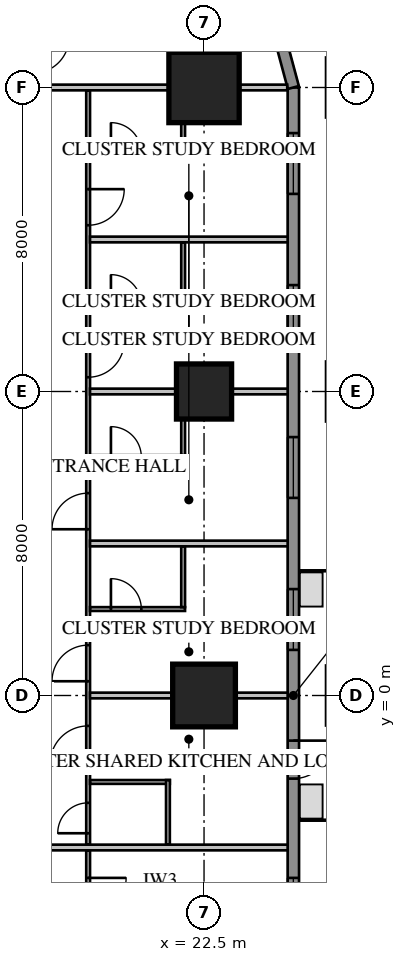
"""IFC4 building model, lengths in metres.
Left out: names, types, materials, properties, quantities, classifications, styles, units other than length and angle.
Written with IfcOpenShell. Run it as: python <this file> out.ifc"""

import sys

from ifc_helpers import new_model, si_unit, direction, frame, frame_2d, origin, origin_2d, place, context, subcontext, project, spatial, rectangle, extrude, element, fill, save


model = new_model("IFC4")
c1 = context("Model", 3, precision=1e-05, world=origin(), true_north=direction((0.0, 1.0)))
c2 = subcontext(c1, "Body", "Model", "MODEL_VIEW")
j1 = project(units=[si_unit("LENGTHUNIT", "METRE"), si_unit("PLANEANGLEUNIT", "RADIAN")], contexts=[c1])
p1 = place(None, origin())
s1 = spatial("IfcSite", under=j1, at=p1, CompositionType="ELEMENT")
p2 = place(p1, origin())
s2 = spatial("IfcBuilding", under=s1, at=p2, CompositionType="ELEMENT")
p3 = place(p2, frame((0.0, 0.0, 50.65)))
s3 = spatial("IfcBuildingStorey", under=s2, at=p3, CompositionType="ELEMENT", Elevation=50.65)
p4 = place(p3, frame((22.5, 0.0, 0.0), z_axis=(0.0, 0.0, 1.0), x_axis=(1.0, 0.0, 0.0)))
e1 = element("IfcColumn", 1, at=p4, inside=s3, PredefinedType="COLUMN", context=c2, shape_type="SweptSolid", body=[
    extrude(rectangle(XDim=1.65, YDim=1.65, at=origin_2d()), origin(), (0.0, 0.0, 1.0), 3.413),
])
p5 = place(p3, frame((22.5, 8.0, 0.0), z_axis=(0.0, 0.0, 1.0), x_axis=(1.0, 0.0, 0.0)))
e2 = element("IfcColumn", 2, at=p5, inside=s3, PredefinedType="COLUMN", context=c2, shape_type="SweptSolid", body=[
    extrude(rectangle(XDim=1.45, YDim=1.45, at=origin_2d()), origin(), (0.0, 0.0, 1.0), 3.413),
])
p6 = place(p3, frame((22.5, 16.0, 0.0), z_axis=(0.0, 0.0, 1.0), x_axis=(1.0, 0.0, 0.0)))
e3 = element("IfcColumn", 3, at=p6, inside=s3, PredefinedType="COLUMN", context=c2, shape_type="SweptSolid", body=[
    extrude(rectangle(XDim=1.85, YDim=1.85, at=origin_2d()), origin(), (0.0, 0.0, 1.0), 3.413),
])
p7 = place(p3, frame((24.85, -16.0, 0.0), z_axis=(0.0, 0.0, 1.0), x_axis=(0.0, 1.0, 0.0)))
e4 = element("IfcWall", 4, at=p7, inside=s3, PredefinedType="SOLIDWALL", context=c2, shape_type="SweptSolid", body=[
    extrude(rectangle(XDim=32.0, YDim=0.3, at=frame_2d((16.0, 0.0))), origin(), (0.0, 0.0, 1.0), 3.65),
])
p8 = place(p7, frame((1.2, 0.0, 0.75)))
e5 = element("IfcOpeningElement", 5, at=p8, cuts=e4, PredefinedType="OPENING", context=c2, shape_type="SweptSolid", body=[
    extrude(rectangle(XDim=1.6, YDim=1.8, at=frame_2d((0.8, 0.9))), frame((0.0, 0.17, 0.0), z_axis=(0.0, -1.0, 0.0), x_axis=(1.0, 0.0, 0.0)), (0.0, 0.0, 1.0), 0.34),
])
p9 = place(p7, frame((5.2, 0.0, 0.75)))
e6 = element("IfcOpeningElement", 6, at=p9, cuts=e4, PredefinedType="OPENING", context=c2, shape_type="SweptSolid", body=[
    extrude(rectangle(XDim=1.6, YDim=1.8, at=frame_2d((0.8, 0.9))), frame((0.0, 0.17, 0.0), z_axis=(0.0, -1.0, 0.0), x_axis=(1.0, 0.0, 0.0)), (0.0, 0.0, 1.0), 0.34),
])
p10 = place(p7, frame((17.2, 0.0, 0.75)))
e7 = element("IfcOpeningElement", 7, at=p10, cuts=e4, PredefinedType="OPENING", context=c2, shape_type="SweptSolid", body=[
    extrude(rectangle(XDim=1.6, YDim=1.8, at=frame_2d((0.8, 0.9))), frame((0.0, 0.17, 0.0), z_axis=(0.0, -1.0, 0.0), x_axis=(1.0, 0.0, 0.0)), (0.0, 0.0, 1.0), 0.34),
])
p11 = place(p7, frame((21.2, 0.0, 0.75)))
e8 = element("IfcOpeningElement", 8, at=p11, cuts=e4, PredefinedType="OPENING", context=c2, shape_type="SweptSolid", body=[
    extrude(rectangle(XDim=1.6, YDim=1.8, at=frame_2d((0.8, 0.9))), frame((0.0, 0.17, 0.0), z_axis=(0.0, -1.0, 0.0), x_axis=(1.0, 0.0, 0.0)), (0.0, 0.0, 1.0), 0.34),
])
p12 = place(p7, frame((25.2, 0.0, 0.75)))
e9 = element("IfcOpeningElement", 9, at=p12, cuts=e4, PredefinedType="OPENING", context=c2, shape_type="SweptSolid", body=[
    extrude(rectangle(XDim=1.6, YDim=1.8, at=frame_2d((0.8, 0.9))), frame((0.0, 0.17, 0.0), z_axis=(0.0, -1.0, 0.0), x_axis=(1.0, 0.0, 0.0)), (0.0, 0.0, 1.0), 0.34),
])
p13 = place(p7, frame((29.2, 0.0, 0.75)))
e10 = element("IfcOpeningElement", 10, at=p13, cuts=e4, PredefinedType="OPENING", context=c2, shape_type="SweptSolid", body=[
    extrude(rectangle(XDim=1.6, YDim=1.8, at=frame_2d((0.8, 0.9))), frame((0.0, 0.17, 0.0), z_axis=(0.0, -1.0, 0.0), x_axis=(1.0, 0.0, 0.0)), (0.0, 0.0, 1.0), 0.34),
])
p14 = place(p7, frame((8.8, 0.0, 0.75)))
e11 = element("IfcOpeningElement", 11, at=p14, cuts=e4, PredefinedType="OPENING", context=c2, shape_type="SweptSolid", body=[
    extrude(rectangle(XDim=2.4, YDim=1.8, at=frame_2d((1.2, 0.9))), frame((0.0, 0.17, 0.0), z_axis=(0.0, -1.0, 0.0), x_axis=(1.0, 0.0, 0.0)), (0.0, 0.0, 1.0), 0.34),
])
p15 = place(p7, frame((13.812, 0.0, 0.0)))
e12 = element("IfcOpeningElement", 12, at=p15, cuts=e4, PredefinedType="OPENING", context=c2, shape_type="SweptSolid", body=[
    extrude(rectangle(XDim=1.0, YDim=2.4, at=frame_2d((0.5, 1.2))), frame((0.0, 0.17, 0.0), z_axis=(0.0, -1.0, 0.0), x_axis=(1.0, 0.0, 0.0)), (0.0, 0.0, 1.0), 0.34),
])
p16 = place(p3, frame((24.85, 16.0, 0.0), z_axis=(0.0, 0.0, 1.0), x_axis=(-0.258839972501, 0.965920218567, 0.0)))
e13 = element("IfcWall", 13, at=p16, inside=s3, PredefinedType="SOLIDWALL", context=c2, shape_type="SweptSolid", body=[
    extrude(rectangle(XDim=4.581, YDim=0.3, at=frame_2d((2.291, 0.0))), origin(), (0.0, 0.0, 1.0), 3.65),
])
p17 = place(p3, frame((19.45, -15.925, 0.0), z_axis=(0.0, 0.0, 1.0), x_axis=(0.0, 1.0, 0.0)))
e14 = element("IfcWall", 14, at=p17, inside=s3, PredefinedType="PARTITIONING", context=c2, shape_type="SweptSolid", body=[
    extrude(rectangle(XDim=11.85, YDim=0.1, at=frame_2d((5.925, 0.0))), origin(), (0.0, 0.0, 1.0), 3.65),
])
p18 = place(p17, frame((10.125, 0.0, 0.0)))
e15 = element("IfcOpeningElement", 15, at=p18, cuts=e14, PredefinedType="OPENING", context=c2, shape_type="SweptSolid", body=[
    extrude(rectangle(XDim=1.0, YDim=2.1, at=frame_2d((0.5, 1.05))), frame((0.0, 0.07, 0.0), z_axis=(0.0, -1.0, 0.0), x_axis=(1.0, 0.0, 0.0)), (0.0, 0.0, 1.0), 0.14),
])
p19 = place(p17, frame((8.3, 0.0, 0.0)))
e16 = element("IfcOpeningElement", 16, at=p19, cuts=e14, PredefinedType="OPENING", context=c2, shape_type="SweptSolid", body=[
    extrude(rectangle(XDim=0.8, YDim=2.1, at=frame_2d((0.4, 1.05))), frame((0.0, 0.07, 0.0), z_axis=(0.0, -1.0, 0.0), x_axis=(1.0, 0.0, 0.0)), (0.0, 0.0, 1.0), 0.14),
])
p20 = place(p17, frame((0.3, 0.0, 0.0)))
e17 = element("IfcOpeningElement", 17, at=p20, cuts=e14, PredefinedType="OPENING", context=c2, shape_type="SweptSolid", body=[
    extrude(rectangle(XDim=0.95, YDim=2.1, at=frame_2d((0.475, 1.05))), frame((0.0, 0.07, 0.0), z_axis=(0.0, -1.0, 0.0), x_axis=(1.0, 0.0, 0.0)), (0.0, 0.0, 1.0), 0.14),
])
p21 = place(p17, frame((4.3, 0.0, 0.0)))
e18 = element("IfcOpeningElement", 18, at=p21, cuts=e14, PredefinedType="OPENING", context=c2, shape_type="SweptSolid", body=[
    extrude(rectangle(XDim=0.95, YDim=2.1, at=frame_2d((0.475, 1.05))), frame((0.0, 0.07, 0.0), z_axis=(0.0, -1.0, 0.0), x_axis=(1.0, 0.0, 0.0)), (0.0, 0.0, 1.0), 0.14),
])
p22 = place(p3, frame((19.45, -3.925, 0.0), z_axis=(0.0, 0.0, 1.0), x_axis=(0.0, 1.0, 0.0)))
e19 = element("IfcWall", 19, at=p22, inside=s3, PredefinedType="PARTITIONING", context=c2, shape_type="SweptSolid", body=[
    extrude(rectangle(XDim=19.85, YDim=0.1, at=frame_2d((9.925, 0.0))), origin(), (0.0, 0.0, 1.0), 3.65),
])
p23 = place(p22, frame((2.125, 0.0, 0.0)))
e20 = element("IfcOpeningElement", 20, at=p23, cuts=e19, PredefinedType="OPENING", context=c2, shape_type="SweptSolid", body=[
    extrude(rectangle(XDim=1.0, YDim=2.1, at=frame_2d((0.5, 1.05))), frame((0.0, 0.07, 0.0), z_axis=(0.0, -1.0, 0.0), x_axis=(1.0, 0.0, 0.0)), (0.0, 0.0, 1.0), 0.14),
])
p24 = place(p22, frame((0.3, 0.0, 0.0)))
e21 = element("IfcOpeningElement", 21, at=p24, cuts=e19, PredefinedType="OPENING", context=c2, shape_type="SweptSolid", body=[
    extrude(rectangle(XDim=0.8, YDim=2.1, at=frame_2d((0.4, 1.05))), frame((0.0, 0.07, 0.0), z_axis=(0.0, -1.0, 0.0), x_axis=(1.0, 0.0, 0.0)), (0.0, 0.0, 1.0), 0.14),
])
p25 = place(p22, frame((4.3, 0.0, 0.0)))
e22 = element("IfcOpeningElement", 22, at=p25, cuts=e19, PredefinedType="OPENING", context=c2, shape_type="SweptSolid", body=[
    extrude(rectangle(XDim=0.95, YDim=2.1, at=frame_2d((0.475, 1.05))), frame((0.0, 0.07, 0.0), z_axis=(0.0, -1.0, 0.0), x_axis=(1.0, 0.0, 0.0)), (0.0, 0.0, 1.0), 0.14),
])
p26 = place(p22, frame((8.3, 0.0, 0.0)))
e23 = element("IfcOpeningElement", 23, at=p26, cuts=e19, PredefinedType="OPENING", context=c2, shape_type="SweptSolid", body=[
    extrude(rectangle(XDim=0.95, YDim=2.1, at=frame_2d((0.475, 1.05))), frame((0.0, 0.07, 0.0), z_axis=(0.0, -1.0, 0.0), x_axis=(1.0, 0.0, 0.0)), (0.0, 0.0, 1.0), 0.14),
])
p27 = place(p22, frame((12.3, 0.0, 0.0)))
e24 = element("IfcOpeningElement", 24, at=p27, cuts=e19, PredefinedType="OPENING", context=c2, shape_type="SweptSolid", body=[
    extrude(rectangle(XDim=0.95, YDim=2.1, at=frame_2d((0.475, 1.05))), frame((0.0, 0.07, 0.0), z_axis=(0.0, -1.0, 0.0), x_axis=(1.0, 0.0, 0.0)), (0.0, 0.0, 1.0), 0.14),
])
p28 = place(p22, frame((16.3, 0.0, 0.0)))
e25 = element("IfcOpeningElement", 25, at=p28, cuts=e19, PredefinedType="OPENING", context=c2, shape_type="SweptSolid", body=[
    extrude(rectangle(XDim=0.95, YDim=2.1, at=frame_2d((0.475, 1.05))), frame((0.0, 0.07, 0.0), z_axis=(0.0, -1.0, 0.0), x_axis=(1.0, 0.0, 0.0)), (0.0, 0.0, 1.0), 0.14),
])
p29 = place(p3, frame((19.5, -2.275, 0.0), z_axis=(0.0, 0.0, 1.0), x_axis=(1.0, 0.0, 0.0)))
e26 = element("IfcWall", 26, at=p29, inside=s3, PredefinedType="PARTITIONING", context=c2, shape_type="SweptSolid", body=[
    extrude(rectangle(XDim=2.1, YDim=0.1, at=frame_2d((1.05, 0.0))), origin(), (0.0, 0.0, 1.0), 3.65),
])
p30 = place(p3, frame((21.55, -3.925, 0.0), z_axis=(0.0, 0.0, 1.0), x_axis=(0.0, 1.0, 0.0)))
e27 = element("IfcWall", 27, at=p30, inside=s3, PredefinedType="PARTITIONING", context=c2, shape_type="SweptSolid", body=[
    extrude(rectangle(XDim=1.7, YDim=0.1, at=frame_2d((0.85, 0.0))), origin(), (0.0, 0.0, 1.0), 3.65),
])
p31 = place(p3, frame((18.1, -4.0, 0.0), z_axis=(0.0, 0.0, 1.0), x_axis=(1.0, 0.0, 0.0)))
e28 = element("IfcWall", 28, at=p31, inside=s3, PredefinedType="PARTITIONING", context=c2, shape_type="SweptSolid", body=[
    extrude(rectangle(XDim=6.6, YDim=0.15, at=frame_2d((3.3, 0.0))), origin(), (0.0, 0.0, 1.0), 3.65),
])
p32 = place(p3, frame((19.5, 0.0, 0.0), z_axis=(0.0, 0.0, 1.0), x_axis=(1.0, 0.0, 0.0)))
e29 = element("IfcWall", 29, at=p32, inside=s3, PredefinedType="PARTITIONING", context=c2, shape_type="SweptSolid", body=[
    extrude(rectangle(XDim=5.2, YDim=0.15, at=frame_2d((2.6, 0.0))), origin(), (0.0, 0.0, 1.0), 2.888),
])
for number, where, z_axis, x_axis in (
    (30, (19.5, 4.0, 0.0), (0.0, 0.0, 1.0), (1.0, 0.0, 0.0)),
    (31, (19.5, 8.0, 0.0), (0.0, 0.0, 1.0), (1.0, 0.0, 0.0)),
    (32, (19.5, 12.0, 0.0), (0.0, 0.0, 1.0), (1.0, 0.0, 0.0)),
):
    element("IfcWall", number, at=place(p3, frame(where, z_axis=z_axis, x_axis=x_axis)), inside=s3, PredefinedType="PARTITIONING", context=c2, shape_type="SweptSolid", body=[
        extrude(rectangle(XDim=5.2, YDim=0.15, at=frame_2d((2.6, 0.0))), origin(), (0.0, 0.0, 1.0), 3.65),
    ])
p33 = place(p3, frame((18.1, 16.0, 0.0), z_axis=(0.0, 0.0, 1.0), x_axis=(1.0, 0.0, 0.0)))
e33 = element("IfcWall", 33, at=p33, inside=s3, PredefinedType="PARTITIONING", context=c2, shape_type="SweptSolid", body=[
    extrude(rectangle(XDim=6.589, YDim=0.15, at=frame_2d((3.295, 0.0))), origin(), (0.0, 0.0, 1.0), 3.65),
])
p34 = place(p3, frame((19.5, 2.275, 0.0), z_axis=(0.0, 0.0, 1.0), x_axis=(1.0, 0.0, 0.0)))
e34 = element("IfcWall", 34, at=p34, inside=s3, PredefinedType="PARTITIONING", context=c2, shape_type="SweptSolid", body=[
    extrude(rectangle(XDim=2.5, YDim=0.1, at=frame_2d((1.25, 0.0))), origin(), (0.0, 0.0, 1.0), 3.65),
])
p35 = place(p34, frame((0.55, 0.0, 0.0)))
e35 = element("IfcOpeningElement", 35, at=p35, cuts=e34, PredefinedType="OPENING", context=c2, shape_type="SweptSolid", body=[
    extrude(rectangle(XDim=0.8, YDim=2.1, at=frame_2d((0.4, 1.05))), frame((0.0, 0.07, 0.0), z_axis=(0.0, -1.0, 0.0), x_axis=(1.0, 0.0, 0.0)), (0.0, 0.0, 1.0), 0.14),
])
p36 = place(p3, frame((21.95, 2.325, 0.0), z_axis=(0.0, 0.0, 1.0), x_axis=(0.0, 1.0, 0.0)))
e36 = element("IfcWall", 36, at=p36, inside=s3, PredefinedType="PARTITIONING", context=c2, shape_type="SweptSolid", body=[
    extrude(rectangle(XDim=1.6, YDim=0.1, at=frame_2d((0.8, 0.0))), origin(), (0.0, 0.0, 1.0), 3.65),
])
p37 = place(p3, frame((19.5, 6.275, 0.0), z_axis=(0.0, 0.0, 1.0), x_axis=(1.0, 0.0, 0.0)))
e37 = element("IfcWall", 37, at=p37, inside=s3, PredefinedType="PARTITIONING", context=c2, shape_type="SweptSolid", body=[
    extrude(rectangle(XDim=2.5, YDim=0.1, at=frame_2d((1.25, 0.0))), origin(), (0.0, 0.0, 1.0), 3.65),
])
p38 = place(p37, frame((0.55, 0.0, 0.0)))
e38 = element("IfcOpeningElement", 38, at=p38, cuts=e37, PredefinedType="OPENING", context=c2, shape_type="SweptSolid", body=[
    extrude(rectangle(XDim=0.8, YDim=2.1, at=frame_2d((0.4, 1.05))), frame((0.0, 0.07, 0.0), z_axis=(0.0, -1.0, 0.0), x_axis=(1.0, 0.0, 0.0)), (0.0, 0.0, 1.0), 0.14),
])
p39 = place(p3, frame((21.95, 6.325, 0.0), z_axis=(0.0, 0.0, 1.0), x_axis=(0.0, 1.0, 0.0)))
e39 = element("IfcWall", 39, at=p39, inside=s3, PredefinedType="PARTITIONING", context=c2, shape_type="SweptSolid", body=[
    extrude(rectangle(XDim=1.6, YDim=0.1, at=frame_2d((0.8, 0.0))), origin(), (0.0, 0.0, 1.0), 3.65),
])
p40 = place(p3, frame((19.5, 10.275, 0.0), z_axis=(0.0, 0.0, 1.0), x_axis=(1.0, 0.0, 0.0)))
e40 = element("IfcWall", 40, at=p40, inside=s3, PredefinedType="PARTITIONING", context=c2, shape_type="SweptSolid", body=[
    extrude(rectangle(XDim=2.5, YDim=0.1, at=frame_2d((1.25, 0.0))), origin(), (0.0, 0.0, 1.0), 3.65),
])
p41 = place(p40, frame((0.55, 0.0, 0.0)))
e41 = element("IfcOpeningElement", 41, at=p41, cuts=e40, PredefinedType="OPENING", context=c2, shape_type="SweptSolid", body=[
    extrude(rectangle(XDim=0.8, YDim=2.1, at=frame_2d((0.4, 1.05))), frame((0.0, 0.07, 0.0), z_axis=(0.0, -1.0, 0.0), x_axis=(1.0, 0.0, 0.0)), (0.0, 0.0, 1.0), 0.14),
])
p42 = place(p3, frame((21.95, 10.325, 0.0), z_axis=(0.0, 0.0, 1.0), x_axis=(0.0, 1.0, 0.0)))
e42 = element("IfcWall", 42, at=p42, inside=s3, PredefinedType="PARTITIONING", context=c2, shape_type="SweptSolid", body=[
    extrude(rectangle(XDim=1.6, YDim=0.1, at=frame_2d((0.8, 0.0))), origin(), (0.0, 0.0, 1.0), 3.65),
])
p43 = place(p3, frame((19.5, 14.275, 0.0), z_axis=(0.0, 0.0, 1.0), x_axis=(1.0, 0.0, 0.0)))
e43 = element("IfcWall", 43, at=p43, inside=s3, PredefinedType="PARTITIONING", context=c2, shape_type="SweptSolid", body=[
    extrude(rectangle(XDim=2.5, YDim=0.1, at=frame_2d((1.25, 0.0))), origin(), (0.0, 0.0, 1.0), 3.65),
])
p44 = place(p43, frame((0.55, 0.0, 0.0)))
e44 = element("IfcOpeningElement", 44, at=p44, cuts=e43, PredefinedType="OPENING", context=c2, shape_type="SweptSolid", body=[
    extrude(rectangle(XDim=0.8, YDim=2.1, at=frame_2d((0.4, 1.05))), frame((0.0, 0.07, 0.0), z_axis=(0.0, -1.0, 0.0), x_axis=(1.0, 0.0, 0.0)), (0.0, 0.0, 1.0), 0.14),
])
p45 = place(p3, frame((21.95, 14.325, 0.0), z_axis=(0.0, 0.0, 1.0), x_axis=(0.0, 1.0, 0.0)))
e45 = element("IfcWall", 45, at=p45, inside=s3, PredefinedType="PARTITIONING", context=c2, shape_type="SweptSolid", body=[
    extrude(rectangle(XDim=1.6, YDim=0.1, at=frame_2d((0.8, 0.0))), origin(), (0.0, 0.0, 1.0), 3.65),
])
p46 = place(p10, origin())
e46 = element("IfcWindow", 46, at=p46, inside=s3, PartitioningType="SINGLE_PANEL", PredefinedType="WINDOW", context=c2, shape_type="SweptSolid", body=[
    extrude(rectangle(XDim=1.6, YDim=1.8, at=frame_2d((0.8, 0.9))), frame((0.0, 0.03, 0.0), z_axis=(0.0, -1.0, 0.0), x_axis=(1.0, 0.0, 0.0)), (0.0, 0.0, 1.0), 0.06),
])
fill(e7, e46)
p47 = place(p11, origin())
e47 = element("IfcWindow", 47, at=p47, inside=s3, PartitioningType="SINGLE_PANEL", PredefinedType="WINDOW", context=c2, shape_type="SweptSolid", body=[
    extrude(rectangle(XDim=1.6, YDim=1.8, at=frame_2d((0.8, 0.9))), frame((0.0, 0.03, 0.0), z_axis=(0.0, -1.0, 0.0), x_axis=(1.0, 0.0, 0.0)), (0.0, 0.0, 1.0), 0.06),
])
fill(e8, e47)
p48 = place(p12, origin())
e48 = element("IfcWindow", 48, at=p48, inside=s3, PartitioningType="SINGLE_PANEL", PredefinedType="WINDOW", context=c2, shape_type="SweptSolid", body=[
    extrude(rectangle(XDim=1.6, YDim=1.8, at=frame_2d((0.8, 0.9))), frame((0.0, 0.03, 0.0), z_axis=(0.0, -1.0, 0.0), x_axis=(1.0, 0.0, 0.0)), (0.0, 0.0, 1.0), 0.06),
])
fill(e9, e48)
p49 = place(p13, origin())
e49 = element("IfcWindow", 49, at=p49, inside=s3, PartitioningType="SINGLE_PANEL", PredefinedType="WINDOW", context=c2, shape_type="SweptSolid", body=[
    extrude(rectangle(XDim=1.6, YDim=1.8, at=frame_2d((0.8, 0.9))), frame((0.0, 0.03, 0.0), z_axis=(0.0, -1.0, 0.0), x_axis=(1.0, 0.0, 0.0)), (0.0, 0.0, 1.0), 0.06),
])
fill(e10, e49)
p50 = place(p14, origin())
e50 = element("IfcWindow", 50, at=p50, inside=s3, PartitioningType="SINGLE_PANEL", PredefinedType="WINDOW", context=c2, shape_type="SweptSolid", body=[
    extrude(rectangle(XDim=2.4, YDim=1.8, at=frame_2d((1.2, 0.9))), frame((0.0, 0.03, 0.0), z_axis=(0.0, -1.0, 0.0), x_axis=(1.0, 0.0, 0.0)), (0.0, 0.0, 1.0), 0.06),
])
fill(e11, e50)
p51 = place(p15, origin())
e51 = element("IfcDoor", 51, at=p51, inside=s3, OperationType="SINGLE_SWING_RIGHT", PredefinedType="DOOR", context=c2, shape_type="SweptSolid", body=[
    extrude(rectangle(XDim=1.0, YDim=2.4, at=frame_2d((0.5, 1.2))), frame((0.0, 0.025, 0.0), z_axis=(0.0, -1.0, 0.0), x_axis=(1.0, 0.0, 0.0)), (0.0, 0.0, 1.0), 0.05),
])
fill(e12, e51)
p52 = place(p18, origin())
e52 = element("IfcDoor", 52, at=p52, inside=s3, OperationType="SINGLE_SWING_RIGHT", PredefinedType="DOOR", context=c2, shape_type="SweptSolid", body=[
    extrude(rectangle(XDim=1.0, YDim=2.1, at=frame_2d((0.5, 1.05))), frame((0.0, 0.025, 0.0), z_axis=(0.0, -1.0, 0.0), x_axis=(1.0, 0.0, 0.0)), (0.0, 0.0, 1.0), 0.05),
])
fill(e15, e52)
p53 = place(p23, origin())
e53 = element("IfcDoor", 53, at=p53, inside=s3, OperationType="SINGLE_SWING_LEFT", PredefinedType="DOOR", context=c2, shape_type="SweptSolid", body=[
    extrude(rectangle(XDim=1.0, YDim=2.1, at=frame_2d((0.5, 1.05))), frame((0.0, 0.025, 0.0), z_axis=(0.0, -1.0, 0.0), x_axis=(1.0, 0.0, 0.0)), (0.0, 0.0, 1.0), 0.05),
])
fill(e20, e53)
p54 = place(p24, origin())
e54 = element("IfcDoor", 54, at=p54, inside=s3, OperationType="SINGLE_SWING_LEFT", PredefinedType="DOOR", context=c2, shape_type="SweptSolid", body=[
    extrude(rectangle(XDim=0.8, YDim=2.1, at=frame_2d((0.4, 1.05))), frame((0.0, 0.025, 0.0), z_axis=(0.0, -1.0, 0.0), x_axis=(1.0, 0.0, 0.0)), (0.0, 0.0, 1.0), 0.05),
])
fill(e21, e54)
p55 = place(p25, origin())
e55 = element("IfcDoor", 55, at=p55, inside=s3, OperationType="SINGLE_SWING_LEFT", PredefinedType="DOOR", context=c2, shape_type="SweptSolid", body=[
    extrude(rectangle(XDim=0.95, YDim=2.1, at=frame_2d((0.475, 1.05))), frame((0.0, 0.025, 0.0), z_axis=(0.0, -1.0, 0.0), x_axis=(1.0, 0.0, 0.0)), (0.0, 0.0, 1.0), 0.05),
])
fill(e22, e55)
p56 = place(p35, origin())
e56 = element("IfcDoor", 56, at=p56, inside=s3, OperationType="SINGLE_SWING_LEFT", PredefinedType="DOOR", context=c2, shape_type="SweptSolid", body=[
    extrude(rectangle(XDim=0.8, YDim=2.1, at=frame_2d((0.4, 1.05))), frame((0.0, 0.025, 0.0), z_axis=(0.0, -1.0, 0.0), x_axis=(1.0, 0.0, 0.0)), (0.0, 0.0, 1.0), 0.05),
])
fill(e35, e56)
p57 = place(p26, origin())
e57 = element("IfcDoor", 57, at=p57, inside=s3, OperationType="SINGLE_SWING_LEFT", PredefinedType="DOOR", context=c2, shape_type="SweptSolid", body=[
    extrude(rectangle(XDim=0.95, YDim=2.1, at=frame_2d((0.475, 1.05))), frame((0.0, 0.025, 0.0), z_axis=(0.0, -1.0, 0.0), x_axis=(1.0, 0.0, 0.0)), (0.0, 0.0, 1.0), 0.05),
])
fill(e23, e57)
p58 = place(p38, origin())
e58 = element("IfcDoor", 58, at=p58, inside=s3, OperationType="SINGLE_SWING_LEFT", PredefinedType="DOOR", context=c2, shape_type="SweptSolid", body=[
    extrude(rectangle(XDim=0.8, YDim=2.1, at=frame_2d((0.4, 1.05))), frame((0.0, 0.025, 0.0), z_axis=(0.0, -1.0, 0.0), x_axis=(1.0, 0.0, 0.0)), (0.0, 0.0, 1.0), 0.05),
])
fill(e38, e58)
p59 = place(p27, origin())
e59 = element("IfcDoor", 59, at=p59, inside=s3, OperationType="SINGLE_SWING_RIGHT", PredefinedType="DOOR", context=c2, shape_type="SweptSolid", body=[
    extrude(rectangle(XDim=0.95, YDim=2.1, at=frame_2d((0.475, 1.05))), frame((0.0, 0.025, 0.0), z_axis=(0.0, -1.0, 0.0), x_axis=(1.0, 0.0, 0.0)), (0.0, 0.0, 1.0), 0.05),
])
fill(e24, e59)
p60 = place(p41, origin())
e60 = element("IfcDoor", 60, at=p60, inside=s3, OperationType="SINGLE_SWING_LEFT", PredefinedType="DOOR", context=c2, shape_type="SweptSolid", body=[
    extrude(rectangle(XDim=0.8, YDim=2.1, at=frame_2d((0.4, 1.05))), frame((0.0, 0.025, 0.0), z_axis=(0.0, -1.0, 0.0), x_axis=(1.0, 0.0, 0.0)), (0.0, 0.0, 1.0), 0.05),
])
fill(e41, e60)
p61 = place(p28, origin())
e61 = element("IfcDoor", 61, at=p61, inside=s3, OperationType="SINGLE_SWING_RIGHT", PredefinedType="DOOR", context=c2, shape_type="SweptSolid", body=[
    extrude(rectangle(XDim=0.95, YDim=2.1, at=frame_2d((0.475, 1.05))), frame((0.0, 0.025, 0.0), z_axis=(0.0, -1.0, 0.0), x_axis=(1.0, 0.0, 0.0)), (0.0, 0.0, 1.0), 0.05),
])
fill(e25, e61)
p62 = place(p44, origin())
e62 = element("IfcDoor", 62, at=p62, inside=s3, OperationType="SINGLE_SWING_LEFT", PredefinedType="DOOR", context=c2, shape_type="SweptSolid", body=[
    extrude(rectangle(XDim=0.8, YDim=2.1, at=frame_2d((0.4, 1.05))), frame((0.0, 0.025, 0.0), z_axis=(0.0, -1.0, 0.0), x_axis=(1.0, 0.0, 0.0)), (0.0, 0.0, 1.0), 0.05),
])
fill(e44, e62)
save(model, sys.argv[1])
